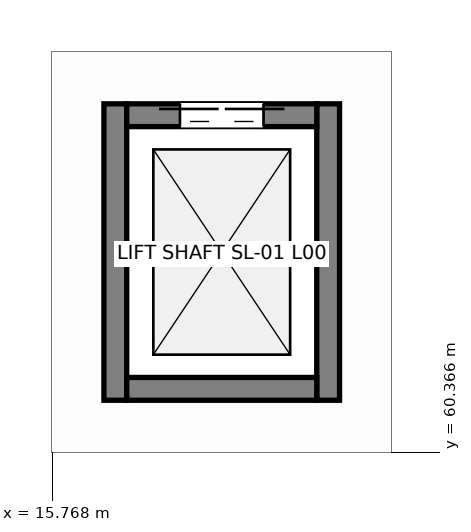
"""IFC4 building model, lengths in metres.
Left out: names, types, materials, properties, quantities, classifications, styles, units other than length and angle.
Written with IfcOpenShell. Run it as: python <this file> out.ifc"""

import sys

from ifc_helpers import new_model, si_unit, direction, frame, frame_2d, origin, place, context, subcontext, project, spatial, rectangle, extrude, element, fill, save


model = new_model("IFC4")
c1 = context("Model", 3, precision=1e-05, world=origin(), true_north=direction((0.0, 1.0)))
c2 = subcontext(c1, "Body", "Model", "MODEL_VIEW")
j1 = project(units=[si_unit("LENGTHUNIT", "METRE"), si_unit("PLANEANGLEUNIT", "RADIAN")], contexts=[c1])
p1 = place(None, origin())
s1 = spatial("IfcSite", under=j1, at=p1, CompositionType="ELEMENT")
p2 = place(p1, origin())
s2 = spatial("IfcBuilding", under=s1, at=p2, CompositionType="ELEMENT")
p3 = place(p2, origin())
s3 = spatial("IfcBuildingStorey", under=s2, at=p3, CompositionType="ELEMENT", Elevation=0.0)
for number, where, z_axis, x_axis in (
    (1, (16.6, 61.05, 0.0), (0.0, 0.0, 1.0), (0.0, 1.0, 0.0)),
    (2, (19.4, 61.05, 0.0), (0.0, 0.0, 1.0), (0.0, 1.0, 0.0)),
):
    element("IfcWall", number, at=place(p3, frame(where, z_axis=z_axis, x_axis=x_axis)), inside=s3, PredefinedType="SHEAR", context=c2, shape_type="SweptSolid", body=[
        extrude(rectangle(XDim=3.9, YDim=0.3, at=frame_2d((1.95, 0.0))), origin(), (0.0, 0.0, 1.0), 4.58),
    ])
p4 = place(p3, frame((16.75, 64.8, 0.0), z_axis=(0.0, 0.0, 1.0), x_axis=(1.0, 0.0, 0.0)))
e3 = element("IfcWall", 3, at=p4, inside=s3, PredefinedType="SHEAR", context=c2, shape_type="SweptSolid", body=[
    extrude(rectangle(XDim=2.5, YDim=0.3, at=frame_2d((1.25, 0.0))), origin(), (0.0, 0.0, 1.0), 4.58),
])
p5 = place(p4, frame((0.7, 0.0, 0.0)))
e4 = element("IfcOpeningElement", 4, at=p5, cuts=e3, PredefinedType="OPENING", context=c2, shape_type="SweptSolid", body=[
    extrude(rectangle(XDim=1.1, YDim=2.15, at=frame_2d((0.55, 1.075))), frame((0.0, 0.16, 0.0), z_axis=(0.0, -1.0, 0.0), x_axis=(1.0, 0.0, 0.0)), (0.0, 0.0, 1.0), 0.32),
])
p6 = place(p3, frame((16.75, 61.2, 0.0), z_axis=(0.0, 0.0, 1.0), x_axis=(1.0, 0.0, 0.0)))
e5 = element("IfcWall", 5, at=p6, inside=s3, PredefinedType="SHEAR", context=c2, shape_type="SweptSolid", body=[
    extrude(rectangle(XDim=2.5, YDim=0.3, at=frame_2d((1.25, 0.0))), origin(), (0.0, 0.0, 1.0), 4.58),
])
p7 = place(p5, origin())
e6 = element("IfcDoor", 6, at=p7, inside=s3, OperationType="DOUBLE_DOOR_SLIDING", PredefinedType="DOOR", context=c2, shape_type="SweptSolid", body=[
    extrude(rectangle(XDim=1.1, YDim=2.15, at=frame_2d((0.55, 1.075))), frame((0.0, 0.025, 0.0), z_axis=(0.0, -1.0, 0.0), x_axis=(1.0, 0.0, 0.0)), (0.0, 0.0, 1.0), 0.05),
])
fill(e4, e6)
save(model, sys.argv[1])
